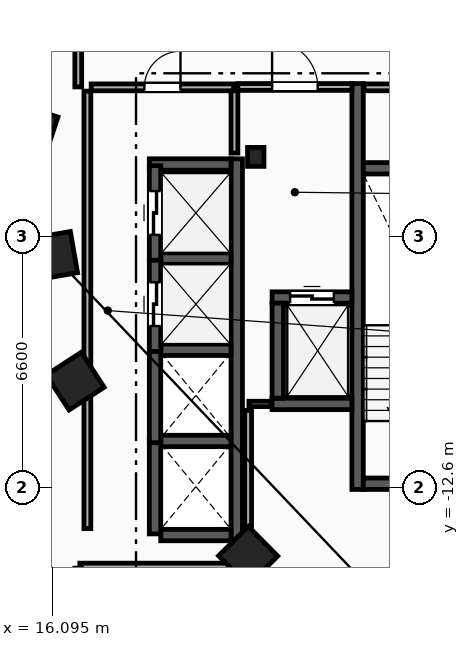
"""IFC4 building model, lengths in metres.
Left out: names, types, materials, properties, quantities, classifications, styles, units other than length and angle.
Written with IfcOpenShell. Run it as: python <this file> out.ifc"""

import sys

from ifc_helpers import new_model, si_unit, direction, frame, frame_2d, origin, origin_2d, place, context, subcontext, project, spatial, rectangle, i_section, extrude, element, fill, save


model = new_model("IFC4")
c1 = context("Model", 3, precision=1e-05, world=origin(), true_north=direction((0.0, 1.0)))
c2 = subcontext(c1, "Body", "Model", "MODEL_VIEW")
j1 = project(units=[si_unit("LENGTHUNIT", "METRE"), si_unit("PLANEANGLEUNIT", "RADIAN")], contexts=[c1])
p1 = place(None, origin())
s1 = spatial("IfcSite", under=j1, at=p1, CompositionType="ELEMENT")
p2 = place(p1, origin())
s2 = spatial("IfcBuilding", under=s1, at=p2, CompositionType="ELEMENT")
p3 = place(p2, frame((0.0, 0.0, 114.2)))
s3 = spatial("IfcBuildingStorey", under=s2, at=p3, CompositionType="ELEMENT", Elevation=114.2)
p4 = place(p3, frame((21.45, -3.9, 0.0), z_axis=(0.0, 0.0, 1.0), x_axis=(1.0, 0.0, 0.0)))
e1 = element("IfcColumn", 1, at=p4, inside=s3, PredefinedType="COLUMN", context=c2, shape_type="SweptSolid", body=[
    extrude(i_section(OverallWidth=0.432, OverallDepth=0.498, WebThickness=0.056, FlangeThickness=0.089, FilletRadius=0.018, at=origin_2d()), origin(), (0.0, 0.0, 1.0), 3.6),
])
for number, where, z_axis, x_axis in (
    (2, (15.55, -3.2, 0.0), (0.0, 0.0, 1.0), (-0.315, -0.949, 0.0)),
    (3, (16.125, -6.5, 0.0), (0.0, 0.0, 1.0), (0.172, -0.985, 0.0)),
    (4, (16.7, -9.8, 0.0), (0.0, 0.0, 1.0), (0.544, -0.839, 0.0)),
    (5, (21.25, -14.4, 0.0), (0.0, 0.0, 1.0), (0.703, -0.711, 0.0)),
):
    element("IfcColumn", number, at=place(p3, frame(where, z_axis=z_axis, x_axis=x_axis)), inside=s3, PredefinedType="COLUMN", context=c2, shape_type="SweptSolid", body=[
        extrude(rectangle(XDim=1.1, YDim=1.1, at=origin_2d()), origin(), (0.0, 0.0, 1.0), 3.6),
    ])
p5 = place(p3, frame((24.13, -12.65, 0.0), z_axis=(0.0, 0.0, 1.0), x_axis=(0.0, 1.0, 0.0)))
e6 = element("IfcWall", 6, at=p5, inside=s3, PredefinedType="SHEAR", context=c2, shape_type="SweptSolid", body=[
    extrude(rectangle(XDim=10.68, YDim=0.3, at=frame_2d((5.34, 0.0))), origin(), (0.0, 0.0, 1.0), 3.3),
])
p6 = place(p3, frame((24.28, -12.5, 0.0), z_axis=(0.0, 0.0, 1.0), x_axis=(1.0, 0.0, 0.0)))
e7 = element("IfcWall", 7, at=p6, inside=s3, PredefinedType="SHEAR", context=c2, shape_type="SweptSolid", body=[
    extrude(rectangle(XDim=3.16, YDim=0.3, at=frame_2d((1.58, 0.0))), origin(), (0.0, 0.0, 1.0), 3.3),
])
p7 = place(p6, frame((1.03, 0.0, 0.0)))
e8 = element("IfcOpeningElement", 8, at=p7, cuts=e7, PredefinedType="OPENING", context=c2, shape_type="SweptSolid", body=[
    extrude(rectangle(XDim=1.1, YDim=2.15, at=frame_2d((0.55, 1.075))), frame((0.0, 0.16, 0.0), z_axis=(0.0, -1.0, 0.0), x_axis=(1.0, 0.0, 0.0)), (0.0, 0.0, 1.0), 0.32),
])
p8 = place(p3, frame((24.28, -4.2, 0.0), z_axis=(0.0, 0.0, 1.0), x_axis=(1.0, 0.0, 0.0)))
e9 = element("IfcWall", 9, at=p8, inside=s3, PredefinedType="SHEAR", context=c2, shape_type="SweptSolid", body=[
    extrude(rectangle(XDim=3.16, YDim=0.3, at=frame_2d((1.58, 0.0))), origin(), (0.0, 0.0, 1.0), 3.3),
])
p9 = place(p3, frame((20.89, -3.8, 0.0), z_axis=(0.0, 0.0, 1.0), x_axis=(0.0, 1.0, 0.0)))
e10 = element("IfcWall", 10, at=p9, inside=s3, PredefinedType="PARTITIONING", context=c2, shape_type="SweptSolid", body=[
    extrude(rectangle(XDim=1.65, YDim=0.18, at=frame_2d((0.825, 0.0))), origin(), (0.0, 0.0, 1.0), 3.3),
])
p10 = place(p3, frame((20.98, -2.06, 0.0), z_axis=(0.0, 0.0, 1.0), x_axis=(1.0, 0.0, 0.0)))
e11 = element("IfcWall", 11, at=p10, inside=s3, PredefinedType="PARTITIONING", context=c2, shape_type="SweptSolid", body=[
    extrude(rectangle(XDim=3.0, YDim=0.18, at=frame_2d((1.5, 0.0))), origin(), (0.0, 0.0, 1.0), 3.3),
])
p11 = place(p10, frame((0.9, 0.0, 0.0)))
e12 = element("IfcOpeningElement", 12, at=p11, cuts=e11, PredefinedType="OPENING", context=c2, shape_type="SweptSolid", body=[
    extrude(rectangle(XDim=1.2, YDim=2.15, at=frame_2d((0.6, 1.075))), frame((0.0, 0.1, 0.0), z_axis=(0.0, -1.0, 0.0), x_axis=(1.0, 0.0, 0.0)), (0.0, 0.0, 1.0), 0.2),
])
p12 = place(p3, frame((21.88, -7.6, 0.0), z_axis=(0.0, 0.0, 1.0), x_axis=(1.0, 0.0, 0.0)))
e13 = element("IfcWall", 13, at=p12, inside=s3, PredefinedType="SHEAR", context=c2, shape_type="SweptSolid", body=[
    extrude(rectangle(XDim=2.1, YDim=0.3, at=frame_2d((1.05, 0.0))), origin(), (0.0, 0.0, 1.0), 3.3),
])
p13 = place(p12, frame((0.475, 0.0, 0.0)))
e14 = element("IfcOpeningElement", 14, at=p13, cuts=e13, PredefinedType="OPENING", context=c2, shape_type="SweptSolid", body=[
    extrude(rectangle(XDim=1.15, YDim=2.2, at=frame_2d((0.575, 1.1))), frame((0.0, 0.16, 0.0), z_axis=(0.0, -1.0, 0.0), x_axis=(1.0, 0.0, 0.0)), (0.0, 0.0, 1.0), 0.32),
])
p14 = place(p3, frame((21.88, -10.4, 0.0), z_axis=(0.0, 0.0, 1.0), x_axis=(1.0, 0.0, 0.0)))
e15 = element("IfcWall", 15, at=p14, inside=s3, PredefinedType="SHEAR", context=c2, shape_type="SweptSolid", body=[
    extrude(rectangle(XDim=2.1, YDim=0.3, at=frame_2d((1.05, 0.0))), origin(), (0.0, 0.0, 1.0), 3.3),
])
p15 = place(p3, frame((22.03, -10.25, 0.0), z_axis=(0.0, 0.0, 1.0), x_axis=(0.0, 1.0, 0.0)))
e16 = element("IfcWall", 16, at=p15, inside=s3, PredefinedType="SHEAR", context=c2, shape_type="SweptSolid", body=[
    extrude(rectangle(XDim=2.5, YDim=0.3, at=frame_2d((1.25, 0.0))), origin(), (0.0, 0.0, 1.0), 3.3),
])
p16 = place(p3, frame((20.95, -14.0, 0.0), z_axis=(0.0, 0.0, 1.0), x_axis=(0.0, 1.0, 0.0)))
e17 = element("IfcWall", 17, at=p16, inside=s3, PredefinedType="SHEAR", context=c2, shape_type="SweptSolid", body=[
    extrude(rectangle(XDim=10.05, YDim=0.3, at=frame_2d((5.025, 0.0))), origin(), (0.0, 0.0, 1.0), 3.3),
])
p17 = place(p3, frame((18.95, -13.85, 0.0), z_axis=(0.0, 0.0, 1.0), x_axis=(1.0, 0.0, 0.0)))
e18 = element("IfcWall", 18, at=p17, inside=s3, PredefinedType="SHEAR", context=c2, shape_type="SweptSolid", body=[
    extrude(rectangle(XDim=1.85, YDim=0.3, at=frame_2d((0.925, 0.0))), origin(), (0.0, 0.0, 1.0), 3.3),
])
p18 = place(p3, frame((18.65, -4.1, 0.0), z_axis=(0.0, 0.0, 1.0), x_axis=(1.0, 0.0, 0.0)))
e19 = element("IfcWall", 19, at=p18, inside=s3, PredefinedType="SHEAR", context=c2, shape_type="SweptSolid", body=[
    extrude(rectangle(XDim=2.15, YDim=0.3, at=frame_2d((1.075, 0.0))), origin(), (0.0, 0.0, 1.0), 3.3),
])
for number, where, z_axis, x_axis in (
    (20, (18.95, -11.375, 0.0), (0.0, 0.0, 1.0), (1.0, 0.0, 0.0)),
    (21, (18.95, -8.975, 0.0), (0.0, 0.0, 1.0), (1.0, 0.0, 0.0)),
    (22, (18.95, -6.575, 0.0), (0.0, 0.0, 1.0), (1.0, 0.0, 0.0)),
):
    element("IfcWall", number, at=place(p3, frame(where, z_axis=z_axis, x_axis=x_axis)), inside=s3, PredefinedType="SHEAR", context=c2, shape_type="SweptSolid", body=[
        extrude(rectangle(XDim=1.85, YDim=0.3, at=frame_2d((0.925, 0.0))), origin(), (0.0, 0.0, 1.0), 3.3),
    ])
for number, where, z_axis, x_axis in (
    (23, (18.8, -13.82, 0.0), (0.0, 0.0, 1.0), (0.0, 1.0, 0.0)),
    (24, (18.8, -11.42, 0.0), (0.0, 0.0, 1.0), (0.0, 1.0, 0.0)),
):
    element("IfcWall", number, at=place(p3, frame(where, z_axis=z_axis, x_axis=x_axis)), inside=s3, PredefinedType="SHEAR", context=c2, shape_type="SweptSolid", body=[
        extrude(rectangle(XDim=2.49, YDim=0.3, at=frame_2d((1.245, 0.0))), origin(), (0.0, 0.0, 1.0), 3.3),
    ])
p19 = place(p3, frame((18.8, -9.02, 0.0), z_axis=(0.0, 0.0, 1.0), x_axis=(0.0, 1.0, 0.0)))
e25 = element("IfcWall", 25, at=p19, inside=s3, PredefinedType="SHEAR", context=c2, shape_type="SweptSolid", body=[
    extrude(rectangle(XDim=2.49, YDim=0.3, at=frame_2d((1.245, 0.0))), origin(), (0.0, 0.0, 1.0), 3.3),
])
p20 = place(p19, frame((0.67, 0.0, 0.0)))
e26 = element("IfcOpeningElement", 26, at=p20, cuts=e25, PredefinedType="OPENING", context=c2, shape_type="SweptSolid", body=[
    extrude(rectangle(XDim=1.15, YDim=2.2, at=frame_2d((0.575, 1.1))), frame((0.0, 0.16, 0.0), z_axis=(0.0, -1.0, 0.0), x_axis=(1.0, 0.0, 0.0)), (0.0, 0.0, 1.0), 0.32),
])
p21 = place(p3, frame((18.8, -6.62, 0.0), z_axis=(0.0, 0.0, 1.0), x_axis=(0.0, 1.0, 0.0)))
e27 = element("IfcWall", 27, at=p21, inside=s3, PredefinedType="SHEAR", context=c2, shape_type="SweptSolid", body=[
    extrude(rectangle(XDim=2.49, YDim=0.3, at=frame_2d((1.245, 0.0))), origin(), (0.0, 0.0, 1.0), 3.3),
])
p22 = place(p21, frame((0.67, 0.0, 0.0)))
e28 = element("IfcOpeningElement", 28, at=p22, cuts=e27, PredefinedType="OPENING", context=c2, shape_type="SweptSolid", body=[
    extrude(rectangle(XDim=1.15, YDim=2.2, at=frame_2d((0.575, 1.1))), frame((0.0, 0.16, 0.0), z_axis=(0.0, -1.0, 0.0), x_axis=(1.0, 0.0, 0.0)), (0.0, 0.0, 1.0), 0.32),
])
p23 = place(p3, frame((17.02, -13.68, 0.0), z_axis=(0.0, 0.0, 1.0), x_axis=(0.0, 1.0, 0.0)))
e29 = element("IfcWall", 29, at=p23, inside=s3, PredefinedType="PARTITIONING", context=c2, shape_type="SweptSolid", body=[
    extrude(rectangle(XDim=11.51, YDim=0.18, at=frame_2d((5.755, 0.0))), origin(), (0.0, 0.0, 1.0), 3.3),
])
p24 = place(p3, frame((17.12, -2.07, 0.0), z_axis=(0.0, 0.0, 1.0), x_axis=(1.0, 0.0, 0.0)))
e30 = element("IfcWall", 30, at=p24, inside=s3, PredefinedType="PARTITIONING", context=c2, shape_type="SweptSolid", body=[
    extrude(rectangle(XDim=3.75, YDim=0.18, at=frame_2d((1.875, 0.0))), origin(), (0.0, 0.0, 1.0), 3.3),
])
p25 = place(p24, frame((1.4, 0.0, 0.0)))
e31 = element("IfcOpeningElement", 31, at=p25, cuts=e30, PredefinedType="OPENING", context=c2, shape_type="SweptSolid", body=[
    extrude(rectangle(XDim=0.95, YDim=2.1, at=frame_2d((0.475, 1.05))), frame((0.0, 0.1, 0.0), z_axis=(0.0, -1.0, 0.0), x_axis=(1.0, 0.0, 0.0)), (0.0, 0.0, 1.0), 0.2),
])
p26 = place(p3, frame((21.27, -10.4, 0.0), z_axis=(0.0, 0.0, 1.0), x_axis=(1.0, 0.0, 0.0)))
e32 = element("IfcWall", 32, at=p26, inside=s3, PredefinedType="PARTITIONING", context=c2, shape_type="SweptSolid", body=[
    extrude(rectangle(XDim=0.59, YDim=0.14, at=frame_2d((0.295, 0.0))), origin(), (0.0, 0.0, 1.0), 3.3),
])
p27 = place(p3, frame((21.25, -14.93, 0.0), z_axis=(0.0, 0.0, 1.0), x_axis=(0.0, 1.0, 0.0)))
e33 = element("IfcWall", 33, at=p27, inside=s3, PredefinedType="PARTITIONING", context=c2, shape_type="SweptSolid", body=[
    extrude(rectangle(XDim=4.36, YDim=0.18, at=frame_2d((2.18, 0.0))), origin(), (0.0, 0.0, 1.0), 3.3),
])
p28 = place(p3, frame((24.3, -2.07, 0.0), z_axis=(0.0, 0.0, 1.0), x_axis=(1.0, 0.0, 0.0)))
e34 = element("IfcWall", 34, at=p28, inside=s3, PredefinedType="PARTITIONING", context=c2, shape_type="SweptSolid", body=[
    extrude(rectangle(XDim=3.12, YDim=0.18, at=frame_2d((1.56, 0.0))), origin(), (0.0, 0.0, 1.0), 3.3),
])
p29 = place(p28, frame((1.085, 0.0, 0.0)))
e35 = element("IfcOpeningElement", 35, at=p29, cuts=e34, PredefinedType="OPENING", context=c2, shape_type="SweptSolid", body=[
    extrude(rectangle(XDim=0.95, YDim=2.1, at=frame_2d((0.475, 1.05))), frame((0.0, 0.1, 0.0), z_axis=(0.0, -1.0, 0.0), x_axis=(1.0, 0.0, 0.0)), (0.0, 0.0, 1.0), 0.2),
])
p30 = place(p3, frame((21.178, -14.68, 0.0), z_axis=(0.0, 0.0, 1.0), x_axis=(-1.0, 0.0, 0.0)))
e36 = element("IfcWall", 36, at=p30, inside=s3, PredefinedType="PARTITIONING", context=c2, shape_type="SweptSolid", body=[
    extrude(rectangle(XDim=4.357, YDim=0.18, at=frame_2d((2.178, 0.0))), origin(), (0.0, 0.0, 1.0), 3.3),
])
p31 = place(p3, frame((16.78, 0.329, 0.0), z_axis=(0.0, 0.0, 1.0), x_axis=(0.0, -1.0, 0.0)))
e37 = element("IfcWall", 37, at=p31, inside=s3, PredefinedType="PARTITIONING", context=c2, shape_type="SweptSolid", body=[
    extrude(rectangle(XDim=2.387, YDim=0.18, at=frame_2d((1.194, 0.0))), origin(), (0.0, 0.0, 1.0), 3.3),
])
p32 = place(p11, origin())
e38 = element("IfcDoor", 38, at=p32, inside=s3, OperationType="SINGLE_SWING_LEFT", PredefinedType="DOOR", context=c2, shape_type="SweptSolid", body=[
    extrude(rectangle(XDim=1.2, YDim=2.15, at=frame_2d((0.6, 1.075))), frame((0.0, 0.025, 0.0), z_axis=(0.0, -1.0, 0.0), x_axis=(1.0, 0.0, 0.0)), (0.0, 0.0, 1.0), 0.05),
])
fill(e12, e38)
p33 = place(p13, origin())
e39 = element("IfcDoor", 39, at=p33, inside=s3, OperationType="SLIDING_TO_LEFT", PredefinedType="TRAPDOOR", context=c2, shape_type="SweptSolid", body=[
    extrude(rectangle(XDim=1.15, YDim=2.2, at=frame_2d((0.575, 1.1))), frame((0.0, 0.025, 0.0), z_axis=(0.0, -1.0, 0.0), x_axis=(1.0, 0.0, 0.0)), (0.0, 0.0, 1.0), 0.05),
])
fill(e14, e39)
p34 = place(p20, origin())
e40 = element("IfcDoor", 40, at=p34, inside=s3, OperationType="SLIDING_TO_LEFT", PredefinedType="TRAPDOOR", context=c2, shape_type="SweptSolid", body=[
    extrude(rectangle(XDim=1.15, YDim=2.2, at=frame_2d((0.575, 1.1))), frame((0.0, 0.025, 0.0), z_axis=(0.0, -1.0, 0.0), x_axis=(1.0, 0.0, 0.0)), (0.0, 0.0, 1.0), 0.05),
])
fill(e26, e40)
p35 = place(p22, origin())
e41 = element("IfcDoor", 41, at=p35, inside=s3, OperationType="SLIDING_TO_LEFT", PredefinedType="TRAPDOOR", context=c2, shape_type="SweptSolid", body=[
    extrude(rectangle(XDim=1.15, YDim=2.2, at=frame_2d((0.575, 1.1))), frame((0.0, 0.025, 0.0), z_axis=(0.0, -1.0, 0.0), x_axis=(1.0, 0.0, 0.0)), (0.0, 0.0, 1.0), 0.05),
])
fill(e28, e41)
p36 = place(p25, origin())
e42 = element("IfcDoor", 42, at=p36, inside=s3, OperationType="SINGLE_SWING_RIGHT", PredefinedType="DOOR", context=c2, shape_type="SweptSolid", body=[
    extrude(rectangle(XDim=0.95, YDim=2.1, at=frame_2d((0.475, 1.05))), frame((0.0, 0.025, 0.0), z_axis=(0.0, -1.0, 0.0), x_axis=(1.0, 0.0, 0.0)), (0.0, 0.0, 1.0), 0.05),
])
fill(e31, e42)
save(model, sys.argv[1])
